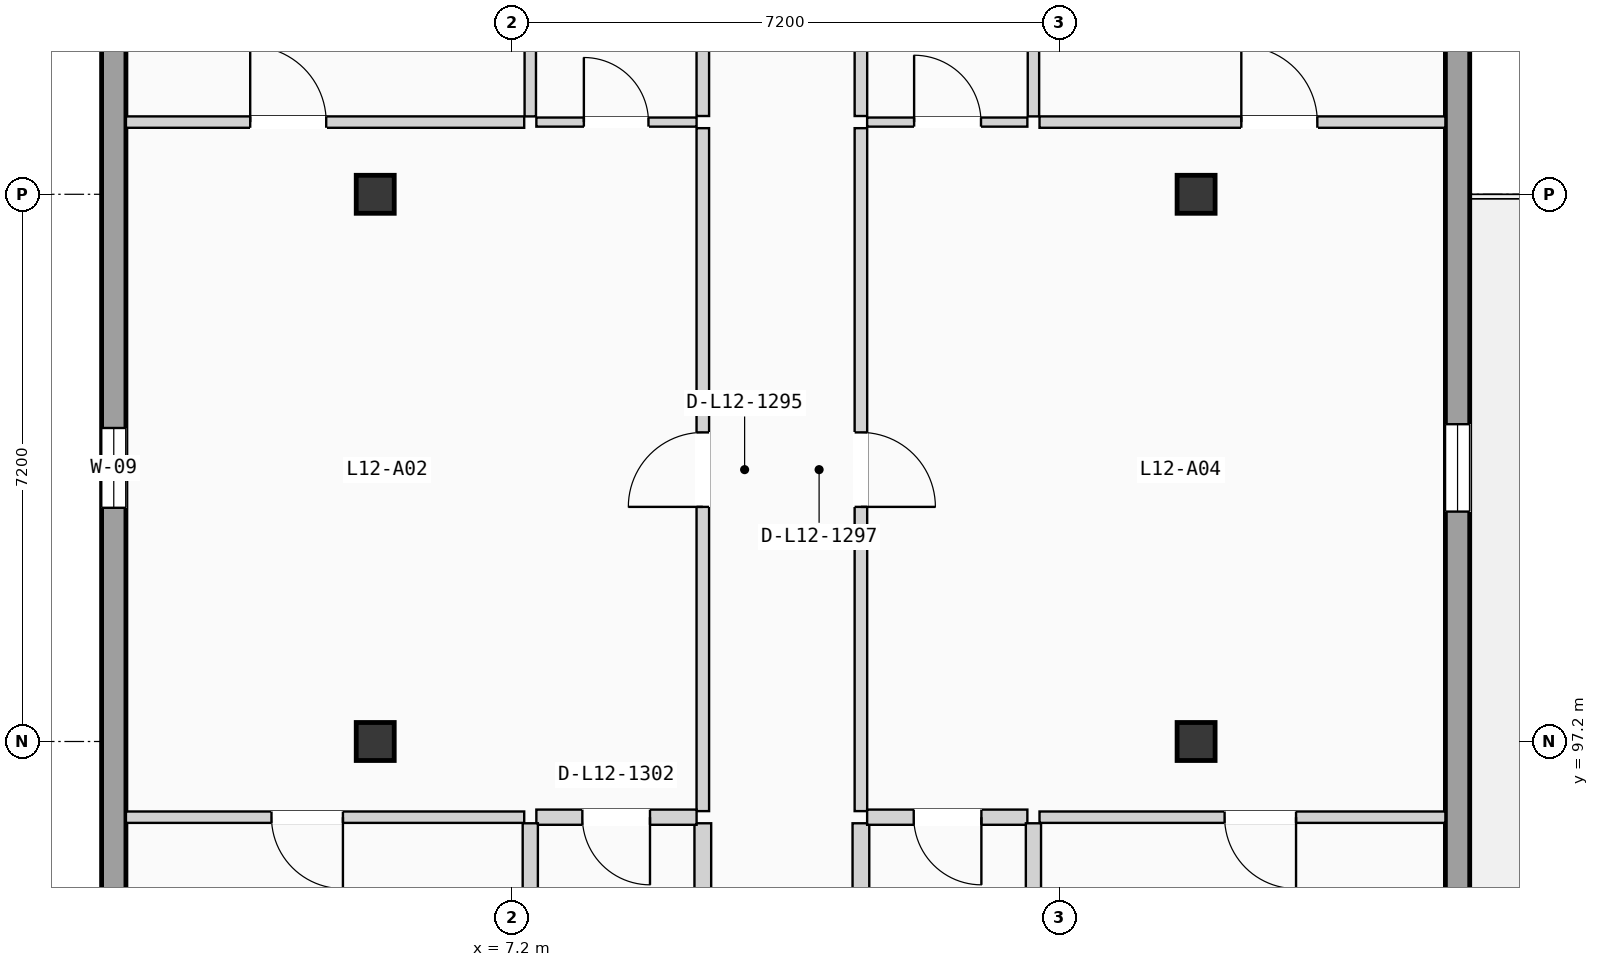
"""IFC4 building model, lengths in metres.
Left out: names, types, materials, properties, quantities, classifications, styles, units other than length and angle.
Written with IfcOpenShell. Run it as: python <this file> out.ifc"""

import sys

from ifc_helpers import new_model, si_unit, direction, frame, frame_2d, origin, origin_2d, place, context, subcontext, project, spatial, rectangle, extrude, element, fill, save


model = new_model("IFC4")
c1 = context("Model", 3, precision=1e-05, world=origin(), true_north=direction((0.0, 1.0)))
c2 = subcontext(c1, "Body", "Model", "MODEL_VIEW")
j1 = project(units=[si_unit("LENGTHUNIT", "METRE"), si_unit("PLANEANGLEUNIT", "RADIAN")], contexts=[c1])
p1 = place(None, origin())
s1 = spatial("IfcSite", under=j1, at=p1, CompositionType="ELEMENT")
p2 = place(p1, origin())
s2 = spatial("IfcBuilding", under=s1, at=p2, CompositionType="ELEMENT")
p3 = place(p2, frame((0.0, 0.0, 40.425)))
s3 = spatial("IfcBuildingStorey", under=s2, at=p3, CompositionType="ELEMENT", Elevation=40.425)
for number, where, z_axis, x_axis in (
    (1, (5.4, 97.2, 0.0), (0.0, 0.0, 1.0), (1.0, 0.0, 0.0)),
    (2, (5.4, 104.4, 0.0), (0.0, 0.0, 1.0), (1.0, 0.0, 0.0)),
    (3, (16.2, 97.2, 0.0), (0.0, 0.0, 1.0), (1.0, 0.0, 0.0)),
    (4, (16.2, 104.4, 0.0), (0.0, 0.0, 1.0), (1.0, 0.0, 0.0)),
):
    element("IfcColumn", number, at=place(p3, frame(where, z_axis=z_axis, x_axis=x_axis)), inside=s3, PredefinedType="COLUMN", context=c2, shape_type="SweptSolid", body=[
        extrude(rectangle(XDim=0.5, YDim=0.5, at=origin_2d()), origin(), (0.0, 0.0, 1.0), 3.15),
    ])
p4 = place(p3, frame((1.96, 68.72, 0.0), z_axis=(0.0, 0.0, 1.0), x_axis=(0.0, 1.0, 0.0)))
e5 = element("IfcWall", 5, at=p4, inside=s3, PredefinedType="SOLIDWALL", context=c2, shape_type="SweptSolid", body=[
    extrude(rectangle(XDim=49.76, YDim=0.32, at=frame_2d((24.88, 0.0))), origin(), (0.0, 0.0, 1.0), 2.89),
])
p5 = place(p4, frame((12.119, 0.0, 0.9)))
e6 = element("IfcOpeningElement", 6, at=p5, cuts=e5, PredefinedType="OPENING", context=c2, shape_type="SweptSolid", body=[
    extrude(rectangle(XDim=1.05, YDim=1.2, at=frame_2d((0.525, 0.6))), frame((0.0, 0.17, 0.0), z_axis=(0.0, -1.0, 0.0), x_axis=(1.0, 0.0, 0.0)), (0.0, 0.0, 1.0), 0.34),
])
p6 = place(p4, frame((8.774, 0.0, 0.855)))
e7 = element("IfcOpeningElement", 7, at=p6, cuts=e5, PredefinedType="OPENING", context=c2, shape_type="SweptSolid", body=[
    extrude(rectangle(XDim=1.05, YDim=1.35, at=frame_2d((0.525, 0.675))), frame((0.0, 0.17, 0.0), z_axis=(0.0, -1.0, 0.0), x_axis=(1.0, 0.0, 0.0)), (0.0, 0.0, 1.0), 0.34),
])
p7 = place(p4, frame((18.022, 0.0, 0.705)))
e8 = element("IfcOpeningElement", 8, at=p7, cuts=e5, PredefinedType="OPENING", context=c2, shape_type="SweptSolid", body=[
    extrude(rectangle(XDim=1.05, YDim=1.5, at=frame_2d((0.525, 0.75))), frame((0.0, 0.17, 0.0), z_axis=(0.0, -1.0, 0.0), x_axis=(1.0, 0.0, 0.0)), (0.0, 0.0, 1.0), 0.34),
])
p8 = place(p4, frame((31.555, 0.0, 0.555)))
e9 = element("IfcOpeningElement", 9, at=p8, cuts=e5, PredefinedType="OPENING", context=c2, shape_type="SweptSolid", body=[
    extrude(rectangle(XDim=1.05, YDim=1.65, at=frame_2d((0.525, 0.825))), frame((0.0, 0.17, 0.0), z_axis=(0.0, -1.0, 0.0), x_axis=(1.0, 0.0, 0.0)), (0.0, 0.0, 1.0), 0.34),
])
p9 = place(p4, frame((24.002, 0.0, 0.85)))
e10 = element("IfcOpeningElement", 10, at=p9, cuts=e5, PredefinedType="OPENING", context=c2, shape_type="SweptSolid", body=[
    extrude(rectangle(XDim=0.95, YDim=1.2, at=frame_2d((0.475, 0.6))), frame((0.0, 0.17, 0.0), z_axis=(0.0, -1.0, 0.0), x_axis=(1.0, 0.0, 0.0)), (0.0, 0.0, 1.0), 0.34),
])
p10 = place(p4, frame((39.02, 0.0, 0.9)))
e11 = element("IfcOpeningElement", 11, at=p10, cuts=e5, PredefinedType="OPENING", context=c2, shape_type="SweptSolid", body=[
    extrude(rectangle(XDim=1.15, YDim=1.2, at=frame_2d((0.575, 0.6))), frame((0.0, 0.17, 0.0), z_axis=(0.0, -1.0, 0.0), x_axis=(1.0, 0.0, 0.0)), (0.0, 0.0, 1.0), 0.34),
])
p11 = place(p3, frame((19.64, 68.72, 0.0), z_axis=(0.0, 0.0, 1.0), x_axis=(0.0, 1.0, 0.0)))
e12 = element("IfcWall", 12, at=p11, inside=s3, PredefinedType="SOLIDWALL", context=c2, shape_type="SweptSolid", body=[
    extrude(rectangle(XDim=49.76, YDim=0.32, at=frame_2d((24.88, 0.0))), origin(), (0.0, 0.0, 1.0), 2.89),
])
p12 = place(p11, frame((12.069, 0.0, 0.855)))
e13 = element("IfcOpeningElement", 13, at=p12, cuts=e12, PredefinedType="OPENING", context=c2, shape_type="SweptSolid", body=[
    extrude(rectangle(XDim=1.15, YDim=1.35, at=frame_2d((0.575, 0.675))), frame((0.0, 0.17, 0.0), z_axis=(0.0, -1.0, 0.0), x_axis=(1.0, 0.0, 0.0)), (0.0, 0.0, 1.0), 0.34),
])
p13 = place(p11, frame((8.724, 0.0, 0.705)))
e14 = element("IfcOpeningElement", 14, at=p13, cuts=e12, PredefinedType="OPENING", context=c2, shape_type="SweptSolid", body=[
    extrude(rectangle(XDim=1.15, YDim=1.5, at=frame_2d((0.575, 0.75))), frame((0.0, 0.17, 0.0), z_axis=(0.0, -1.0, 0.0), x_axis=(1.0, 0.0, 0.0)), (0.0, 0.0, 1.0), 0.34),
])
p14 = place(p11, frame((17.879, 0.0, 0.0)))
e15 = element("IfcOpeningElement", 15, at=p14, cuts=e12, PredefinedType="OPENING", context=c2, shape_type="SweptSolid", body=[
    extrude(rectangle(XDim=0.95, YDim=2.15, at=frame_2d((0.475, 1.075))), frame((0.0, 0.17, 0.0), z_axis=(0.0, -1.0, 0.0), x_axis=(1.0, 0.0, 0.0)), (0.0, 0.0, 1.0), 0.34),
])
p15 = place(p11, frame((31.505, 0.0, 0.555)))
e16 = element("IfcOpeningElement", 16, at=p15, cuts=e12, PredefinedType="OPENING", context=c2, shape_type="SweptSolid", body=[
    extrude(rectangle(XDim=1.15, YDim=1.65, at=frame_2d((0.575, 0.825))), frame((0.0, 0.17, 0.0), z_axis=(0.0, -1.0, 0.0), x_axis=(1.0, 0.0, 0.0)), (0.0, 0.0, 1.0), 0.34),
])
p16 = place(p11, frame((24.002, 0.0, 0.85)))
e17 = element("IfcOpeningElement", 17, at=p16, cuts=e12, PredefinedType="OPENING", context=c2, shape_type="SweptSolid", body=[
    extrude(rectangle(XDim=0.95, YDim=1.2, at=frame_2d((0.475, 0.6))), frame((0.0, 0.17, 0.0), z_axis=(0.0, -1.0, 0.0), x_axis=(1.0, 0.0, 0.0)), (0.0, 0.0, 1.0), 0.34),
])
p17 = place(p11, frame((38.97, 0.0, 0.9)))
e18 = element("IfcOpeningElement", 18, at=p17, cuts=e12, PredefinedType="OPENING", context=c2, shape_type="SweptSolid", body=[
    extrude(rectangle(XDim=1.25, YDim=1.2, at=frame_2d((0.625, 0.6))), frame((0.0, 0.17, 0.0), z_axis=(0.0, -1.0, 0.0), x_axis=(1.0, 0.0, 0.0)), (0.0, 0.0, 1.0), 0.34),
])
p18 = place(p3, frame((9.71, 96.284, 0.0), z_axis=(0.0, 0.0, 1.0), x_axis=(0.0, 1.0, 0.0)))
e19 = element("IfcWall", 19, at=p18, inside=s3, PredefinedType="PARTITIONING", context=c2, shape_type="SweptSolid", body=[
    extrude(rectangle(XDim=8.986, YDim=0.165, at=frame_2d((4.493, 0.0))), origin(), (0.0, 0.0, 1.0), 2.87),
])
p19 = place(p18, frame((4.003, 0.0, 0.0)))
e20 = element("IfcOpeningElement", 20, at=p19, cuts=e19, PredefinedType="OPENING", context=c2, shape_type="SweptSolid", body=[
    extrude(rectangle(XDim=0.98, YDim=2.08, at=frame_2d((0.49, 1.04))), frame((0.0, 0.093, 0.0), z_axis=(0.0, -1.0, 0.0), x_axis=(1.0, 0.0, 0.0)), (0.0, 0.0, 1.0), 0.185),
])
p20 = place(p3, frame((9.71, 89.466, 0.0), z_axis=(0.0, 0.0, 1.0), x_axis=(0.0, 1.0, 0.0)))
e21 = element("IfcWall", 21, at=p20, inside=s3, PredefinedType="PLUMBINGWALL", context=c2, shape_type="SweptSolid", body=[
    extrude(rectangle(XDim=6.658, YDim=0.22, at=frame_2d((3.329, 0.0))), origin(), (0.0, 0.0, 1.0), 2.87),
])
p21 = place(p3, frame((9.71, 105.43, 0.0), z_axis=(0.0, 0.0, 1.0), x_axis=(0.0, 1.0, 0.0)))
e22 = element("IfcWall", 22, at=p21, inside=s3, PredefinedType="PARTITIONING", context=c2, shape_type="SweptSolid", body=[
    extrude(rectangle(XDim=5.77, YDim=0.165, at=frame_2d((2.885, 0.0))), origin(), (0.0, 0.0, 1.0), 2.87),
])
p22 = place(p3, frame((11.79, 96.284, 0.0), z_axis=(0.0, 0.0, 1.0), x_axis=(0.0, 1.0, 0.0)))
e23 = element("IfcWall", 23, at=p22, inside=s3, PredefinedType="PARTITIONING", context=c2, shape_type="SweptSolid", body=[
    extrude(rectangle(XDim=8.986, YDim=0.165, at=frame_2d((4.493, 0.0))), origin(), (0.0, 0.0, 1.0), 2.87),
])
p23 = place(p22, frame((4.003, 0.0, 0.0)))
e24 = element("IfcOpeningElement", 24, at=p23, cuts=e23, PredefinedType="OPENING", context=c2, shape_type="SweptSolid", body=[
    extrude(rectangle(XDim=0.98, YDim=2.08, at=frame_2d((0.49, 1.04))), frame((0.0, 0.093, 0.0), z_axis=(0.0, -1.0, 0.0), x_axis=(1.0, 0.0, 0.0)), (0.0, 0.0, 1.0), 0.185),
])
p24 = place(p3, frame((11.79, 89.466, 0.0), z_axis=(0.0, 0.0, 1.0), x_axis=(0.0, 1.0, 0.0)))
e25 = element("IfcWall", 25, at=p24, inside=s3, PredefinedType="PLUMBINGWALL", context=c2, shape_type="SweptSolid", body=[
    extrude(rectangle(XDim=6.658, YDim=0.22, at=frame_2d((3.329, 0.0))), origin(), (0.0, 0.0, 1.0), 2.87),
])
p25 = place(p3, frame((11.79, 105.43, 0.0), z_axis=(0.0, 0.0, 1.0), x_axis=(0.0, 1.0, 0.0)))
e26 = element("IfcWall", 26, at=p25, inside=s3, PredefinedType="PARTITIONING", context=c2, shape_type="SweptSolid", body=[
    extrude(rectangle(XDim=5.77, YDim=0.165, at=frame_2d((2.885, 0.0))), origin(), (0.0, 0.0, 1.0), 2.87),
])
p26 = place(p3, frame((7.52, 96.204, 0.0), z_axis=(0.0, 0.0, 1.0), x_axis=(1.0, 0.0, 0.0)))
e27 = element("IfcWall", 27, at=p26, inside=s3, PredefinedType="PLUMBINGWALL", context=c2, shape_type="SweptSolid", body=[
    extrude(rectangle(XDim=2.108, YDim=0.2, at=frame_2d((1.054, 0.0))), origin(), (0.0, 0.0, 1.0), 2.87),
])
p27 = place(p26, frame((0.605, 0.0, 0.0)))
e28 = element("IfcOpeningElement", 28, at=p27, cuts=e27, PredefinedType="OPENING", context=c2, shape_type="SweptSolid", body=[
    extrude(rectangle(XDim=0.89, YDim=2.03, at=frame_2d((0.445, 1.015))), frame((0.0, 0.11, 0.0), z_axis=(0.0, -1.0, 0.0), x_axis=(1.0, 0.0, 0.0)), (0.0, 0.0, 1.0), 0.22),
])
p28 = place(p3, frame((7.52, 105.35, 0.0), z_axis=(0.0, 0.0, 1.0), x_axis=(1.0, 0.0, 0.0)))
e29 = element("IfcWall", 29, at=p28, inside=s3, PredefinedType="PARTITIONING", context=c2, shape_type="SweptSolid", body=[
    extrude(rectangle(XDim=2.108, YDim=0.12, at=frame_2d((1.054, 0.0))), origin(), (0.0, 0.0, 1.0), 2.87),
])
p29 = place(p28, frame((0.625, 0.0, 0.0)))
e30 = element("IfcOpeningElement", 30, at=p29, cuts=e29, PredefinedType="OPENING", context=c2, shape_type="SweptSolid", body=[
    extrude(rectangle(XDim=0.85, YDim=2.01, at=frame_2d((0.425, 1.005))), frame((0.0, 0.07, 0.0), z_axis=(0.0, -1.0, 0.0), x_axis=(1.0, 0.0, 0.0)), (0.0, 0.0, 1.0), 0.14),
])
p30 = place(p3, frame((2.12, 96.204, 0.0), z_axis=(0.0, 0.0, 1.0), x_axis=(1.0, 0.0, 0.0)))
e31 = element("IfcWall", 31, at=p30, inside=s3, PredefinedType="PARTITIONING", context=c2, shape_type="SweptSolid", body=[
    extrude(rectangle(XDim=5.24, YDim=0.15, at=frame_2d((2.62, 0.0))), origin(), (0.0, 0.0, 1.0), 2.87),
])
p31 = place(p30, frame((1.915, 0.0, 0.0)))
e32 = element("IfcOpeningElement", 32, at=p31, cuts=e31, PredefinedType="OPENING", context=c2, shape_type="SweptSolid", body=[
    extrude(rectangle(XDim=0.94, YDim=2.06, at=frame_2d((0.47, 1.03))), frame((0.0, 0.085, 0.0), z_axis=(0.0, -1.0, 0.0), x_axis=(1.0, 0.0, 0.0)), (0.0, 0.0, 1.0), 0.17),
])
p32 = place(p3, frame((2.12, 105.35, 0.0), z_axis=(0.0, 0.0, 1.0), x_axis=(1.0, 0.0, 0.0)))
e33 = element("IfcWall", 33, at=p32, inside=s3, PredefinedType="PARTITIONING", context=c2, shape_type="SweptSolid", body=[
    extrude(rectangle(XDim=5.24, YDim=0.15, at=frame_2d((2.62, 0.0))), origin(), (0.0, 0.0, 1.0), 2.87),
])
p33 = place(p32, frame((1.635, 0.0, 0.0)))
e34 = element("IfcOpeningElement", 34, at=p33, cuts=e33, PredefinedType="OPENING", context=c2, shape_type="SweptSolid", body=[
    extrude(rectangle(XDim=1.0, YDim=2.06, at=frame_2d((0.5, 1.03))), frame((0.0, 0.085, 0.0), z_axis=(0.0, -1.0, 0.0), x_axis=(1.0, 0.0, 0.0)), (0.0, 0.0, 1.0), 0.17),
])
p34 = place(p3, frame((7.44, 89.466, 0.0), z_axis=(0.0, 0.0, 1.0), x_axis=(0.0, 1.0, 0.0)))
e35 = element("IfcWall", 35, at=p34, inside=s3, PredefinedType="PLUMBINGWALL", context=c2, shape_type="SweptSolid", body=[
    extrude(rectangle(XDim=6.658, YDim=0.2, at=frame_2d((3.329, 0.0))), origin(), (0.0, 0.0, 1.0), 2.87),
])
p35 = place(p3, frame((7.44, 105.425, 0.0), z_axis=(0.0, 0.0, 1.0), x_axis=(0.0, 1.0, 0.0)))
e36 = element("IfcWall", 36, at=p35, inside=s3, PredefinedType="PARTITIONING", context=c2, shape_type="SweptSolid", body=[
    extrude(rectangle(XDim=5.775, YDim=0.15, at=frame_2d((2.887, 0.0))), origin(), (0.0, 0.0, 1.0), 2.87),
])
p36 = place(p3, frame((11.872, 96.204, 0.0), z_axis=(0.0, 0.0, 1.0), x_axis=(1.0, 0.0, 0.0)))
e37 = element("IfcWall", 37, at=p36, inside=s3, PredefinedType="PLUMBINGWALL", context=c2, shape_type="SweptSolid", body=[
    extrude(rectangle(XDim=2.108, YDim=0.2, at=frame_2d((1.054, 0.0))), origin(), (0.0, 0.0, 1.0), 2.87),
])
p37 = place(p36, frame((0.613, 0.0, 0.0)))
e38 = element("IfcOpeningElement", 38, at=p37, cuts=e37, PredefinedType="OPENING", context=c2, shape_type="SweptSolid", body=[
    extrude(rectangle(XDim=0.89, YDim=2.03, at=frame_2d((0.445, 1.015))), frame((0.0, 0.11, 0.0), z_axis=(0.0, -1.0, 0.0), x_axis=(1.0, 0.0, 0.0)), (0.0, 0.0, 1.0), 0.22),
])
p38 = place(p3, frame((11.872, 105.35, 0.0), z_axis=(0.0, 0.0, 1.0), x_axis=(1.0, 0.0, 0.0)))
e39 = element("IfcWall", 39, at=p38, inside=s3, PredefinedType="PARTITIONING", context=c2, shape_type="SweptSolid", body=[
    extrude(rectangle(XDim=2.108, YDim=0.12, at=frame_2d((1.054, 0.0))), origin(), (0.0, 0.0, 1.0), 2.87),
])
p39 = place(p38, frame((0.618, 0.0, 0.0)))
e40 = element("IfcOpeningElement", 40, at=p39, cuts=e39, PredefinedType="OPENING", context=c2, shape_type="SweptSolid", body=[
    extrude(rectangle(XDim=0.88, YDim=2.02, at=frame_2d((0.44, 1.01))), frame((0.0, 0.07, 0.0), z_axis=(0.0, -1.0, 0.0), x_axis=(1.0, 0.0, 0.0)), (0.0, 0.0, 1.0), 0.14),
])
p40 = place(p3, frame((14.14, 96.204, 0.0), z_axis=(0.0, 0.0, 1.0), x_axis=(1.0, 0.0, 0.0)))
e41 = element("IfcWall", 41, at=p40, inside=s3, PredefinedType="PARTITIONING", context=c2, shape_type="SweptSolid", body=[
    extrude(rectangle(XDim=5.34, YDim=0.15, at=frame_2d((2.67, 0.0))), origin(), (0.0, 0.0, 1.0), 2.87),
])
p41 = place(p40, frame((2.435, 0.0, 0.0)))
e42 = element("IfcOpeningElement", 42, at=p41, cuts=e41, PredefinedType="OPENING", context=c2, shape_type="SweptSolid", body=[
    extrude(rectangle(XDim=0.94, YDim=2.06, at=frame_2d((0.47, 1.03))), frame((0.0, 0.085, 0.0), z_axis=(0.0, -1.0, 0.0), x_axis=(1.0, 0.0, 0.0)), (0.0, 0.0, 1.0), 0.17),
])
p42 = place(p3, frame((14.14, 105.35, 0.0), z_axis=(0.0, 0.0, 1.0), x_axis=(1.0, 0.0, 0.0)))
e43 = element("IfcWall", 43, at=p42, inside=s3, PredefinedType="PARTITIONING", context=c2, shape_type="SweptSolid", body=[
    extrude(rectangle(XDim=5.34, YDim=0.15, at=frame_2d((2.67, 0.0))), origin(), (0.0, 0.0, 1.0), 2.87),
])
p43 = place(p42, frame((2.655, 0.0, 0.0)))
e44 = element("IfcOpeningElement", 44, at=p43, cuts=e43, PredefinedType="OPENING", context=c2, shape_type="SweptSolid", body=[
    extrude(rectangle(XDim=1.0, YDim=2.06, at=frame_2d((0.5, 1.03))), frame((0.0, 0.085, 0.0), z_axis=(0.0, -1.0, 0.0), x_axis=(1.0, 0.0, 0.0)), (0.0, 0.0, 1.0), 0.17),
])
p44 = place(p3, frame((14.06, 89.466, 0.0), z_axis=(0.0, 0.0, 1.0), x_axis=(0.0, 1.0, 0.0)))
e45 = element("IfcWall", 45, at=p44, inside=s3, PredefinedType="PLUMBINGWALL", context=c2, shape_type="SweptSolid", body=[
    extrude(rectangle(XDim=6.658, YDim=0.2, at=frame_2d((3.329, 0.0))), origin(), (0.0, 0.0, 1.0), 2.87),
])
p45 = place(p3, frame((14.06, 105.425, 0.0), z_axis=(0.0, 0.0, 1.0), x_axis=(0.0, 1.0, 0.0)))
e46 = element("IfcWall", 46, at=p45, inside=s3, PredefinedType="PARTITIONING", context=c2, shape_type="SweptSolid", body=[
    extrude(rectangle(XDim=5.775, YDim=0.15, at=frame_2d((2.887, 0.0))), origin(), (0.0, 0.0, 1.0), 2.87),
])
p46 = place(p8, origin())
e47 = element("IfcWindow", 47, at=p46, inside=s3, PartitioningType="SINGLE_PANEL", PredefinedType="WINDOW", context=c2, shape_type="SweptSolid", body=[
    extrude(rectangle(XDim=1.05, YDim=1.65, at=frame_2d((0.525, 0.825))), frame((0.0, 0.03, 0.0), z_axis=(0.0, -1.0, 0.0), x_axis=(1.0, 0.0, 0.0)), (0.0, 0.0, 1.0), 0.06),
])
fill(e9, e47)
p47 = place(p15, origin())
e48 = element("IfcWindow", 48, at=p47, inside=s3, PartitioningType="SINGLE_PANEL", PredefinedType="WINDOW", context=c2, shape_type="SweptSolid", body=[
    extrude(rectangle(XDim=1.15, YDim=1.65, at=frame_2d((0.575, 0.825))), frame((0.0, 0.03, 0.0), z_axis=(0.0, -1.0, 0.0), x_axis=(1.0, 0.0, 0.0)), (0.0, 0.0, 1.0), 0.06),
])
fill(e16, e48)
p48 = place(p19, origin())
e49 = element("IfcDoor", 49, at=p48, inside=s3, OperationType="SINGLE_SWING_LEFT", PredefinedType="DOOR", context=c2, shape_type="SweptSolid", body=[
    extrude(rectangle(XDim=0.98, YDim=2.08, at=frame_2d((0.49, 1.04))), frame((0.0, 0.025, 0.0), z_axis=(0.0, -1.0, 0.0), x_axis=(1.0, 0.0, 0.0)), (0.0, 0.0, 1.0), 0.05),
])
fill(e20, e49)
p49 = place(p23, frame((0.98, 0.0, 0.0), z_axis=(0.0, 0.0, 1.0), x_axis=(-1.0, 0.0, 0.0)))
e50 = element("IfcDoor", 50, at=p49, inside=s3, OperationType="SINGLE_SWING_LEFT", PredefinedType="DOOR", context=c2, shape_type="SweptSolid", body=[
    extrude(rectangle(XDim=0.98, YDim=2.08, at=frame_2d((0.49, 1.04))), frame((0.0, 0.025, 0.0), z_axis=(0.0, -1.0, 0.0), x_axis=(1.0, 0.0, 0.0)), (0.0, 0.0, 1.0), 0.05),
])
fill(e24, e50)
p50 = place(p27, frame((0.89, 0.0, 0.0), z_axis=(0.0, 0.0, 1.0), x_axis=(-1.0, 0.0, 0.0)))
e51 = element("IfcDoor", 51, at=p50, inside=s3, OperationType="SINGLE_SWING_RIGHT", PredefinedType="DOOR", context=c2, shape_type="SweptSolid", body=[
    extrude(rectangle(XDim=0.89, YDim=2.03, at=frame_2d((0.445, 1.015))), frame((0.0, 0.025, 0.0), z_axis=(0.0, -1.0, 0.0), x_axis=(1.0, 0.0, 0.0)), (0.0, 0.0, 1.0), 0.05),
])
fill(e28, e51)
p51 = place(p29, origin())
e52 = element("IfcDoor", 52, at=p51, inside=s3, OperationType="SINGLE_SWING_LEFT", PredefinedType="DOOR", context=c2, shape_type="SweptSolid", body=[
    extrude(rectangle(XDim=0.85, YDim=2.01, at=frame_2d((0.425, 1.005))), frame((0.0, 0.025, 0.0), z_axis=(0.0, -1.0, 0.0), x_axis=(1.0, 0.0, 0.0)), (0.0, 0.0, 1.0), 0.05),
])
fill(e30, e52)
p52 = place(p31, frame((0.94, 0.0, 0.0), z_axis=(0.0, 0.0, 1.0), x_axis=(-1.0, 0.0, 0.0)))
e53 = element("IfcDoor", 53, at=p52, inside=s3, OperationType="SINGLE_SWING_RIGHT", PredefinedType="DOOR", context=c2, shape_type="SweptSolid", body=[
    extrude(rectangle(XDim=0.94, YDim=2.06, at=frame_2d((0.47, 1.03))), frame((0.0, 0.025, 0.0), z_axis=(0.0, -1.0, 0.0), x_axis=(1.0, 0.0, 0.0)), (0.0, 0.0, 1.0), 0.05),
])
fill(e32, e53)
p53 = place(p33, origin())
e54 = element("IfcDoor", 54, at=p53, inside=s3, OperationType="SINGLE_SWING_LEFT", PredefinedType="DOOR", context=c2, shape_type="SweptSolid", body=[
    extrude(rectangle(XDim=1.0, YDim=2.06, at=frame_2d((0.5, 1.03))), frame((0.0, 0.025, 0.0), z_axis=(0.0, -1.0, 0.0), x_axis=(1.0, 0.0, 0.0)), (0.0, 0.0, 1.0), 0.05),
])
fill(e34, e54)
p54 = place(p37, frame((0.89, 0.0, 0.0), z_axis=(0.0, 0.0, 1.0), x_axis=(-1.0, 0.0, 0.0)))
e55 = element("IfcDoor", 55, at=p54, inside=s3, OperationType="SINGLE_SWING_RIGHT", PredefinedType="DOOR", context=c2, shape_type="SweptSolid", body=[
    extrude(rectangle(XDim=0.89, YDim=2.03, at=frame_2d((0.445, 1.015))), frame((0.0, 0.025, 0.0), z_axis=(0.0, -1.0, 0.0), x_axis=(1.0, 0.0, 0.0)), (0.0, 0.0, 1.0), 0.05),
])
fill(e38, e55)
p55 = place(p39, origin())
e56 = element("IfcDoor", 56, at=p55, inside=s3, OperationType="SINGLE_SWING_LEFT", PredefinedType="DOOR", context=c2, shape_type="SweptSolid", body=[
    extrude(rectangle(XDim=0.88, YDim=2.02, at=frame_2d((0.44, 1.01))), frame((0.0, 0.025, 0.0), z_axis=(0.0, -1.0, 0.0), x_axis=(1.0, 0.0, 0.0)), (0.0, 0.0, 1.0), 0.05),
])
fill(e40, e56)
p56 = place(p41, frame((0.94, 0.0, 0.0), z_axis=(0.0, 0.0, 1.0), x_axis=(-1.0, 0.0, 0.0)))
e57 = element("IfcDoor", 57, at=p56, inside=s3, OperationType="SINGLE_SWING_RIGHT", PredefinedType="DOOR", context=c2, shape_type="SweptSolid", body=[
    extrude(rectangle(XDim=0.94, YDim=2.06, at=frame_2d((0.47, 1.03))), frame((0.0, 0.025, 0.0), z_axis=(0.0, -1.0, 0.0), x_axis=(1.0, 0.0, 0.0)), (0.0, 0.0, 1.0), 0.05),
])
fill(e42, e57)
p57 = place(p43, origin())
e58 = element("IfcDoor", 58, at=p57, inside=s3, OperationType="SINGLE_SWING_LEFT", PredefinedType="DOOR", context=c2, shape_type="SweptSolid", body=[
    extrude(rectangle(XDim=1.0, YDim=2.06, at=frame_2d((0.5, 1.03))), frame((0.0, 0.025, 0.0), z_axis=(0.0, -1.0, 0.0), x_axis=(1.0, 0.0, 0.0)), (0.0, 0.0, 1.0), 0.05),
])
fill(e44, e58)
save(model, sys.argv[1])
